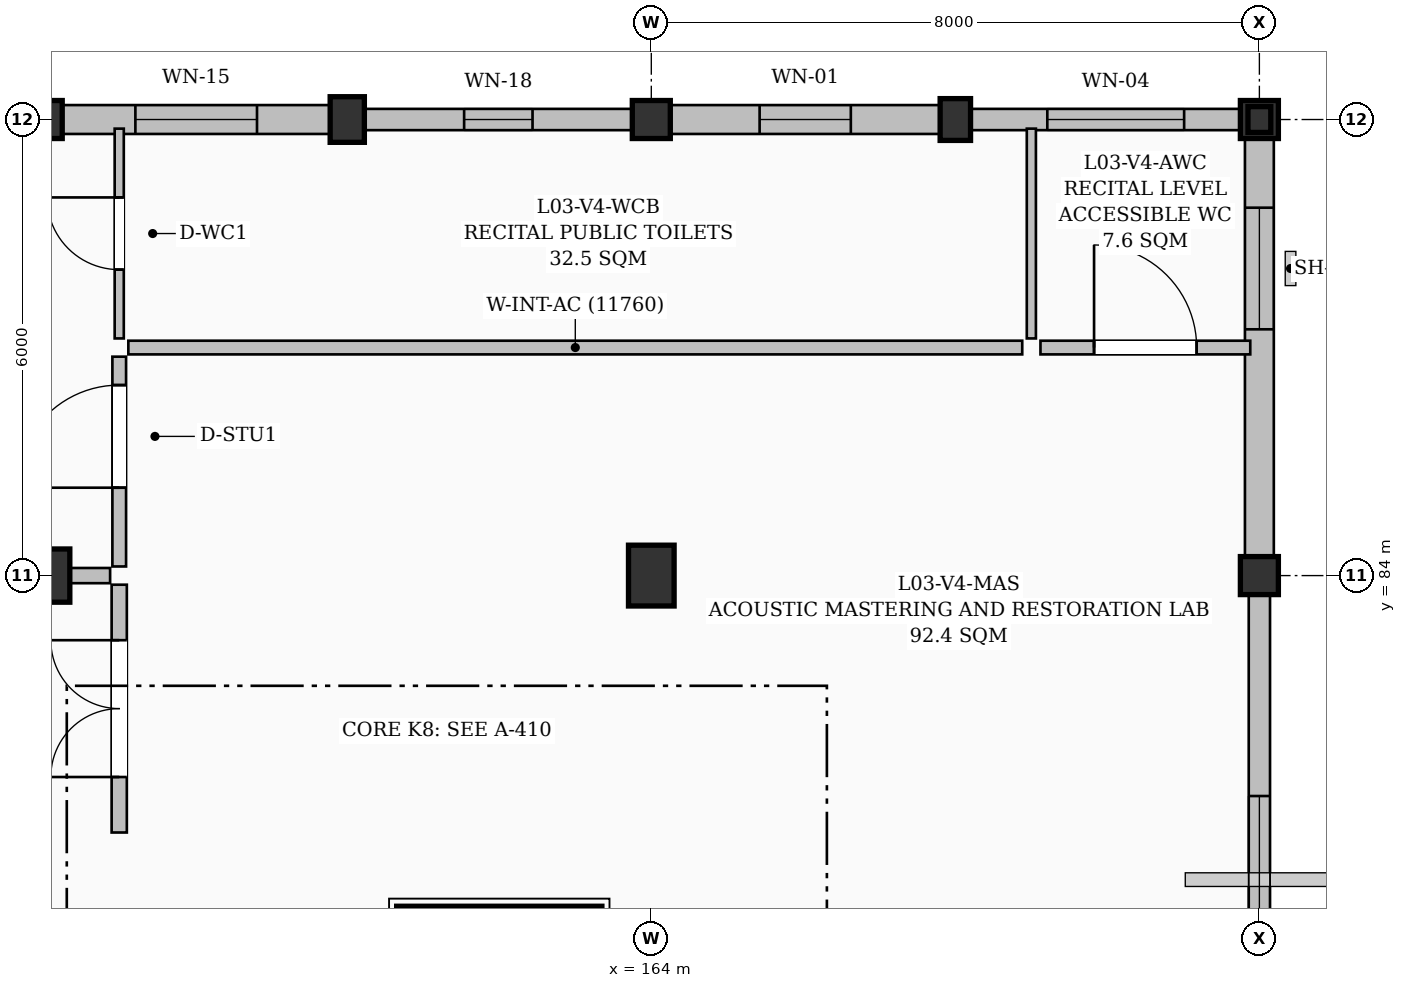
"""IFC4 building model, lengths in metres.
Left out: names, types, materials, properties, quantities, classifications, styles, units other than length and angle.
Written with IfcOpenShell. Run it as: python <this file> out.ifc"""

import sys

from ifc_helpers import new_model, si_unit, direction, frame, frame_2d, origin, origin_2d, place, context, subcontext, project, spatial, rectangle, i_section, extrude, element, fill, save


model = new_model("IFC4")
c1 = context("Model", 3, precision=1e-05, world=origin(), true_north=direction((0.0, 1.0)))
c2 = subcontext(c1, "Body", "Model", "MODEL_VIEW")
j1 = project(units=[si_unit("LENGTHUNIT", "METRE"), si_unit("PLANEANGLEUNIT", "RADIAN")], contexts=[c1])
p1 = place(None, origin())
s1 = spatial("IfcSite", under=j1, at=p1, CompositionType="ELEMENT")
p2 = place(p1, origin())
s2 = spatial("IfcBuilding", under=s1, at=p2, CompositionType="ELEMENT")
p3 = place(p2, frame((0.0, 0.0, 13.8)))
s3 = spatial("IfcBuildingStorey", under=s2, at=p3, CompositionType="ELEMENT", Elevation=13.8)
p4 = place(p3, frame((156.0, 84.0, 0.0), z_axis=(0.0, 0.0, 1.0), x_axis=(1.0, 0.0, 0.0)))
e1 = element("IfcColumn", 1, at=p4, inside=s3, PredefinedType="COLUMN", context=c2, shape_type="SweptSolid", body=[
    extrude(rectangle(XDim=0.7, YDim=0.7, at=origin_2d()), origin(), (0.0, 0.0, 1.0), 4.5),
])
p5 = place(p3, frame((156.0, 90.0, 0.0), z_axis=(0.0, 0.0, 1.0), x_axis=(1.0, 0.0, 0.0)))
e2 = element("IfcColumn", 2, at=p5, inside=s3, PredefinedType="COLUMN", context=c2, shape_type="SweptSolid", body=[
    extrude(rectangle(XDim=0.5, YDim=0.5, at=origin_2d()), origin(), (0.0, 0.0, 1.0), 4.5),
])
p6 = place(p3, frame((160.0, 90.0, 0.0), z_axis=(0.0, 0.0, 1.0), x_axis=(1.0, 0.0, 0.0)))
e3 = element("IfcColumn", 3, at=p6, inside=s3, PredefinedType="PILASTER", context=c2, shape_type="SweptSolid", body=[
    extrude(rectangle(XDim=0.45, YDim=0.6, at=origin_2d()), origin(), (0.0, 0.0, 1.0), 4.5),
])
p7 = place(p3, frame((164.0, 84.0, 0.0), z_axis=(0.0, 0.0, 1.0), x_axis=(1.0, 0.0, 0.0)))
e4 = element("IfcColumn", 4, at=p7, inside=s3, PredefinedType="COLUMN", context=c2, shape_type="SweptSolid", body=[
    extrude(rectangle(XDim=0.6, YDim=0.8, at=origin_2d()), origin(), (0.0, 0.0, 1.0), 4.5),
])
p8 = place(p3, frame((164.0, 90.0, 0.0), z_axis=(0.0, 0.0, 1.0), x_axis=(1.0, 0.0, 0.0)))
e5 = element("IfcColumn", 5, at=p8, inside=s3, PredefinedType="COLUMN", context=c2, shape_type="SweptSolid", body=[
    extrude(rectangle(XDim=0.5, YDim=0.5, at=origin_2d()), origin(), (0.0, 0.0, 1.0), 4.5),
])
p9 = place(p3, frame((168.0, 90.0, 0.0), z_axis=(0.0, 0.0, 1.0), x_axis=(1.0, 0.0, 0.0)))
e6 = element("IfcColumn", 6, at=p9, inside=s3, PredefinedType="PILASTER", context=c2, shape_type="SweptSolid", body=[
    extrude(rectangle(XDim=0.4, YDim=0.55, at=origin_2d()), origin(), (0.0, 0.0, 1.0), 4.5),
])
for number, where, z_axis, x_axis in (
    (7, (172.0, 84.0, 0.0), (0.0, 0.0, 1.0), (1.0, 0.0, 0.0)),
    (8, (172.0, 90.0, 0.0), (0.0, 0.0, 1.0), (1.0, 0.0, 0.0)),
):
    element("IfcColumn", number, at=place(p3, frame(where, z_axis=z_axis, x_axis=x_axis)), inside=s3, PredefinedType="COLUMN", context=c2, shape_type="SweptSolid", body=[
        extrude(rectangle(XDim=0.5, YDim=0.5, at=origin_2d()), origin(), (0.0, 0.0, 1.0), 4.5),
    ])
p10 = place(p3, frame((172.0, 90.0, 4.5), z_axis=(0.0, 0.0, 1.0), x_axis=(1.0, 0.0, 0.0)))
e9 = element("IfcColumn", 9, at=p10, inside=s3, PredefinedType="COLUMN", context=c2, shape_type="SweptSolid", body=[
    extrude(i_section(OverallWidth=0.3, OverallDepth=0.34, WebThickness=0.012, FlangeThickness=0.021, FilletRadius=0.027, at=origin_2d()), origin(), (0.0, 0.0, 1.0), 1.454),
])
p11 = place(p3, frame((156.25, 90.0, 0.0), z_axis=(0.0, 0.0, 1.0), x_axis=(1.0, 0.0, 0.0)))
e10 = element("IfcWall", 10, at=p11, inside=s3, PredefinedType="SOLIDWALL", context=c2, shape_type="SweptSolid", body=[
    extrude(rectangle(XDim=3.525, YDim=0.38, at=frame_2d((1.762, 0.0))), origin(), (0.0, 0.0, 1.0), 4.125),
])
p12 = place(p11, frame((0.962, 0.0, 0.95)))
e11 = element("IfcOpeningElement", 11, at=p12, cuts=e10, PredefinedType="OPENING", context=c2, shape_type="SweptSolid", body=[
    extrude(rectangle(XDim=1.6, YDim=1.2, at=frame_2d((0.8, 0.6))), frame((0.0, 0.2, 0.0), z_axis=(0.0, -1.0, 0.0), x_axis=(1.0, 0.0, 0.0)), (0.0, 0.0, 1.0), 0.4),
])
p13 = place(p3, frame((160.225, 90.0, 0.0), z_axis=(0.0, 0.0, 1.0), x_axis=(1.0, 0.0, 0.0)))
e12 = element("IfcWall", 12, at=p13, inside=s3, PredefinedType="SOLIDWALL", context=c2, shape_type="SweptSolid", body=[
    extrude(rectangle(XDim=3.525, YDim=0.28, at=frame_2d((1.762, 0.0))), origin(), (0.0, 0.0, 1.0), 4.125),
])
p14 = place(p13, frame((1.312, 0.0, 0.95)))
e13 = element("IfcOpeningElement", 13, at=p14, cuts=e12, PredefinedType="OPENING", context=c2, shape_type="SweptSolid", body=[
    extrude(rectangle(XDim=0.9, YDim=1.8, at=frame_2d((0.45, 0.9))), frame((0.0, 0.15, 0.0), z_axis=(0.0, -1.0, 0.0), x_axis=(1.0, 0.0, 0.0)), (0.0, 0.0, 1.0), 0.3),
])
p15 = place(p3, frame((164.25, 90.0, 0.0), z_axis=(0.0, 0.0, 1.0), x_axis=(1.0, 0.0, 0.0)))
e14 = element("IfcWall", 14, at=p15, inside=s3, PredefinedType="SOLIDWALL", context=c2, shape_type="SweptSolid", body=[
    extrude(rectangle(XDim=3.55, YDim=0.38, at=frame_2d((1.775, 0.0))), origin(), (0.0, 0.0, 1.0), 4.125),
])
p16 = place(p15, frame((1.175, 0.0, 0.95)))
e15 = element("IfcOpeningElement", 15, at=p16, cuts=e14, PredefinedType="OPENING", context=c2, shape_type="SweptSolid", body=[
    extrude(rectangle(XDim=1.2, YDim=1.8, at=frame_2d((0.6, 0.9))), frame((0.0, 0.2, 0.0), z_axis=(0.0, -1.0, 0.0), x_axis=(1.0, 0.0, 0.0)), (0.0, 0.0, 1.0), 0.4),
])
p17 = place(p3, frame((168.2, 90.0, 0.0), z_axis=(0.0, 0.0, 1.0), x_axis=(1.0, 0.0, 0.0)))
e16 = element("IfcWall", 16, at=p17, inside=s3, PredefinedType="SOLIDWALL", context=c2, shape_type="SweptSolid", body=[
    extrude(rectangle(XDim=3.55, YDim=0.28, at=frame_2d((1.775, 0.0))), origin(), (0.0, 0.0, 1.0), 4.125),
])
p18 = place(p17, frame((1.01, 0.0, 0.95)))
e17 = element("IfcOpeningElement", 17, at=p18, cuts=e16, PredefinedType="OPENING", context=c2, shape_type="SweptSolid", body=[
    extrude(rectangle(XDim=1.8, YDim=1.8, at=frame_2d((0.9, 0.9))), frame((0.0, 0.15, 0.0), z_axis=(0.0, -1.0, 0.0), x_axis=(1.0, 0.0, 0.0)), (0.0, 0.0, 1.0), 0.3),
])
p19 = place(p3, frame((172.0, 89.75, 0.0), z_axis=(0.0, 0.0, 1.0), x_axis=(0.0, -1.0, 0.0)))
e18 = element("IfcWall", 18, at=p19, inside=s3, PredefinedType="SOLIDWALL", context=c2, shape_type="SweptSolid", body=[
    extrude(rectangle(XDim=5.5, YDim=0.38, at=frame_2d((2.75, 0.0))), origin(), (0.0, 0.0, 1.0), 3.585),
])
p20 = place(p19, frame((0.91, 0.0, 0.95)))
e19 = element("IfcOpeningElement", 19, at=p20, cuts=e18, PredefinedType="OPENING", context=c2, shape_type="SweptSolid", body=[
    extrude(rectangle(XDim=1.6, YDim=1.8, at=frame_2d((0.8, 0.9))), frame((0.0, 0.2, 0.0), z_axis=(0.0, -1.0, 0.0), x_axis=(1.0, 0.0, 0.0)), (0.0, 0.0, 1.0), 0.4),
])
p21 = place(p3, frame((172.0, 83.75, 0.0), z_axis=(0.0, 0.0, 1.0), x_axis=(0.0, -1.0, 0.0)))
e20 = element("IfcWall", 20, at=p21, inside=s3, PredefinedType="SOLIDWALL", context=c2, shape_type="SweptSolid", body=[
    extrude(rectangle(XDim=7.5, YDim=0.28, at=frame_2d((3.75, 0.0))), origin(), (0.0, 0.0, 1.0), 3.585),
])
p22 = place(p21, frame((2.65, 0.0, 0.95)))
e21 = element("IfcOpeningElement", 21, at=p22, cuts=e20, PredefinedType="OPENING", context=c2, shape_type="SweptSolid", body=[
    extrude(rectangle(XDim=2.2, YDim=1.8, at=frame_2d((1.1, 0.9))), frame((0.0, 0.15, 0.0), z_axis=(0.0, -1.0, 0.0), x_axis=(1.0, 0.0, 0.0)), (0.0, 0.0, 1.0), 0.3),
])
p23 = place(p3, frame((163.35, 79.5, 0.0), z_axis=(0.0, 0.0, 1.0), x_axis=(-1.0, 0.0, 0.0)))
e22 = element("IfcWall", 22, at=p23, inside=s3, PredefinedType="SHEAR", context=c2, shape_type="SweptSolid", body=[
    extrude(rectangle(XDim=2.7, YDim=0.3, at=frame_2d((1.35, 0.0))), origin(), (0.0, 0.0, 1.0), 4.25),
])
p24 = place(p3, frame((140.37, 84.0, 0.0), z_axis=(0.0, 0.0, 1.0), x_axis=(1.0, 0.0, 0.0)))
e23 = element("IfcWall", 23, at=p24, inside=s3, PredefinedType="PARTITIONING", context=c2, shape_type="SweptSolid", body=[
    extrude(rectangle(XDim=16.51, YDim=0.2, at=frame_2d((8.255, 0.0))), origin(), (0.0, 0.0, 1.0), 4.25),
])
p25 = place(p24, frame((9.336, 0.0, 0.0)))
e24 = element("IfcOpeningElement", 24, at=p25, cuts=e23, PredefinedType="OPENING", context=c2, shape_type="SweptSolid", body=[
    extrude(rectangle(XDim=1.8, YDim=2.35, at=frame_2d((0.9, 1.175))), frame((0.0, 0.11, 0.0), z_axis=(0.0, -1.0, 0.0), x_axis=(1.0, 0.0, 0.0)), (0.0, 0.0, 1.0), 0.22),
])
p26 = place(p3, frame((157.0, 80.62, 0.0), z_axis=(0.0, 0.0, 1.0), x_axis=(0.0, 1.0, 0.0)))
e25 = element("IfcWall", 25, at=p26, inside=s3, PredefinedType="PARTITIONING", context=c2, shape_type="SweptSolid", body=[
    extrude(rectangle(XDim=3.26, YDim=0.2, at=frame_2d((1.63, 0.0))), origin(), (0.0, 0.0, 1.0), 4.25),
])
p27 = place(p26, frame((0.73, 0.0, 0.0)))
e26 = element("IfcOpeningElement", 26, at=p27, cuts=e25, PredefinedType="OPENING", context=c2, shape_type="SweptSolid", body=[
    extrude(rectangle(XDim=1.8, YDim=2.35, at=frame_2d((0.9, 1.175))), frame((0.0, 0.11, 0.0), z_axis=(0.0, -1.0, 0.0), x_axis=(1.0, 0.0, 0.0)), (0.0, 0.0, 1.0), 0.22),
])
p28 = place(p3, frame((157.0, 84.12, 0.0), z_axis=(0.0, 0.0, 1.0), x_axis=(0.0, 1.0, 0.0)))
e27 = element("IfcWall", 27, at=p28, inside=s3, PredefinedType="PARTITIONING", context=c2, shape_type="SweptSolid", body=[
    extrude(rectangle(XDim=2.76, YDim=0.18, at=frame_2d((1.38, 0.0))), origin(), (0.0, 0.0, 1.0), 4.25),
])
p29 = place(p28, frame((1.036, 0.0, 0.0)))
e28 = element("IfcOpeningElement", 28, at=p29, cuts=e27, PredefinedType="OPENING", context=c2, shape_type="SweptSolid", body=[
    extrude(rectangle(XDim=1.35, YDim=2.2, at=frame_2d((0.675, 1.1))), frame((0.0, 0.1, 0.0), z_axis=(0.0, -1.0, 0.0), x_axis=(1.0, 0.0, 0.0)), (0.0, 0.0, 1.0), 0.2),
])
p30 = place(p3, frame((157.0, 87.12, 0.0), z_axis=(0.0, 0.0, 1.0), x_axis=(0.0, 1.0, 0.0)))
e29 = element("IfcWall", 29, at=p30, inside=s3, PredefinedType="PARTITIONING", context=c2, shape_type="SweptSolid", body=[
    extrude(rectangle(XDim=2.76, YDim=0.12, at=frame_2d((1.38, 0.0))), origin(), (0.0, 0.0, 1.0), 4.25),
])
p31 = place(p30, frame((0.905, 0.0, 0.0)))
e30 = element("IfcOpeningElement", 30, at=p31, cuts=e29, PredefinedType="OPENING", context=c2, shape_type="SweptSolid", body=[
    extrude(rectangle(XDim=0.95, YDim=2.1, at=frame_2d((0.475, 1.05))), frame((0.0, 0.07, 0.0), z_axis=(0.0, -1.0, 0.0), x_axis=(1.0, 0.0, 0.0)), (0.0, 0.0, 1.0), 0.14),
])
p32 = place(p3, frame((169.12, 87.0, 0.0), z_axis=(0.0, 0.0, 1.0), x_axis=(1.0, 0.0, 0.0)))
e31 = element("IfcWall", 31, at=p32, inside=s3, PredefinedType="PARTITIONING", context=c2, shape_type="SweptSolid", body=[
    extrude(rectangle(XDim=2.76, YDim=0.18, at=frame_2d((1.38, 0.0))), origin(), (0.0, 0.0, 1.0), 4.25),
])
p33 = place(p32, frame((0.705, 0.0, 0.0)))
e32 = element("IfcOpeningElement", 32, at=p33, cuts=e31, PredefinedType="OPENING", context=c2, shape_type="SweptSolid", body=[
    extrude(rectangle(XDim=1.35, YDim=2.2, at=frame_2d((0.675, 1.1))), frame((0.0, 0.1, 0.0), z_axis=(0.0, -1.0, 0.0), x_axis=(1.0, 0.0, 0.0)), (0.0, 0.0, 1.0), 0.2),
])
p34 = place(p3, frame((157.12, 87.0, 0.0), z_axis=(0.0, 0.0, 1.0), x_axis=(1.0, 0.0, 0.0)))
e33 = element("IfcWall", 33, at=p34, inside=s3, PredefinedType="PARTITIONING", context=c2, shape_type="SweptSolid", body=[
    extrude(rectangle(XDim=11.76, YDim=0.18, at=frame_2d((5.88, 0.0))), origin(), (0.0, 0.0, 1.0), 4.25),
])
p35 = place(p3, frame((169.0, 87.12, 0.0), z_axis=(0.0, 0.0, 1.0), x_axis=(0.0, 1.0, 0.0)))
e34 = element("IfcWall", 34, at=p35, inside=s3, PredefinedType="PARTITIONING", context=c2, shape_type="SweptSolid", body=[
    extrude(rectangle(XDim=2.76, YDim=0.12, at=frame_2d((1.38, 0.0))), origin(), (0.0, 0.0, 1.0), 4.25),
])
p36 = place(p12, origin())
e35 = element("IfcWindow", 35, at=p36, inside=s3, PartitioningType="DOUBLE_PANEL_HORIZONTAL", PredefinedType="WINDOW", context=c2, shape_type="SweptSolid", body=[
    extrude(rectangle(XDim=1.6, YDim=1.2, at=frame_2d((0.8, 0.6))), frame((0.0, 0.03, 0.0), z_axis=(0.0, -1.0, 0.0), x_axis=(1.0, 0.0, 0.0)), (0.0, 0.0, 1.0), 0.06),
])
fill(e11, e35)
p37 = place(p14, origin())
e36 = element("IfcWindow", 36, at=p37, inside=s3, PartitioningType="SINGLE_PANEL", PredefinedType="WINDOW", context=c2, shape_type="SweptSolid", body=[
    extrude(rectangle(XDim=0.9, YDim=1.8, at=frame_2d((0.45, 0.9))), frame((0.0, 0.03, 0.0), z_axis=(0.0, -1.0, 0.0), x_axis=(1.0, 0.0, 0.0)), (0.0, 0.0, 1.0), 0.06),
])
fill(e13, e36)
p38 = place(p16, origin())
e37 = element("IfcWindow", 37, at=p38, inside=s3, PartitioningType="SINGLE_PANEL", PredefinedType="WINDOW", context=c2, shape_type="SweptSolid", body=[
    extrude(rectangle(XDim=1.2, YDim=1.8, at=frame_2d((0.6, 0.9))), frame((0.0, 0.03, 0.0), z_axis=(0.0, -1.0, 0.0), x_axis=(1.0, 0.0, 0.0)), (0.0, 0.0, 1.0), 0.06),
])
fill(e15, e37)
p39 = place(p18, origin())
e38 = element("IfcWindow", 38, at=p39, inside=s3, PartitioningType="DOUBLE_PANEL_VERTICAL", PredefinedType="WINDOW", context=c2, shape_type="SweptSolid", body=[
    extrude(rectangle(XDim=1.8, YDim=1.8, at=frame_2d((0.9, 0.9))), frame((0.0, 0.03, 0.0), z_axis=(0.0, -1.0, 0.0), x_axis=(1.0, 0.0, 0.0)), (0.0, 0.0, 1.0), 0.06),
])
fill(e17, e38)
p40 = place(p20, origin())
e39 = element("IfcWindow", 39, at=p40, inside=s3, PartitioningType="DOUBLE_PANEL_VERTICAL", PredefinedType="WINDOW", context=c2, shape_type="SweptSolid", body=[
    extrude(rectangle(XDim=1.6, YDim=1.8, at=frame_2d((0.8, 0.9))), frame((0.0, 0.03, 0.0), z_axis=(0.0, -1.0, 0.0), x_axis=(1.0, 0.0, 0.0)), (0.0, 0.0, 1.0), 0.06),
])
fill(e19, e39)
p41 = place(p22, origin())
e40 = element("IfcWindow", 40, at=p41, inside=s3, PartitioningType="TRIPLE_PANEL_VERTICAL", PredefinedType="WINDOW", context=c2, shape_type="SweptSolid", body=[
    extrude(rectangle(XDim=2.2, YDim=1.8, at=frame_2d((1.1, 0.9))), frame((0.0, 0.03, 0.0), z_axis=(0.0, -1.0, 0.0), x_axis=(1.0, 0.0, 0.0)), (0.0, 0.0, 1.0), 0.06),
])
fill(e21, e40)
p42 = place(p27, origin())
e41 = element("IfcDoor", 41, at=p42, inside=s3, OperationType="DOUBLE_DOOR_SINGLE_SWING", PredefinedType="DOOR", context=c2, shape_type="SweptSolid", body=[
    extrude(rectangle(XDim=1.8, YDim=2.35, at=frame_2d((0.9, 1.175))), frame((0.0, 0.025, 0.0), z_axis=(0.0, -1.0, 0.0), x_axis=(1.0, 0.0, 0.0)), (0.0, 0.0, 1.0), 0.05),
])
fill(e26, e41)
p43 = place(p29, origin())
e42 = element("IfcDoor", 42, at=p43, inside=s3, OperationType="SINGLE_SWING_LEFT", PredefinedType="DOOR", context=c2, shape_type="SweptSolid", body=[
    extrude(rectangle(XDim=1.35, YDim=2.2, at=frame_2d((0.675, 1.1))), frame((0.0, 0.025, 0.0), z_axis=(0.0, -1.0, 0.0), x_axis=(1.0, 0.0, 0.0)), (0.0, 0.0, 1.0), 0.05),
])
fill(e28, e42)
p44 = place(p31, origin())
e43 = element("IfcDoor", 43, at=p44, inside=s3, OperationType="SINGLE_SWING_RIGHT", PredefinedType="DOOR", context=c2, shape_type="SweptSolid", body=[
    extrude(rectangle(XDim=0.95, YDim=2.1, at=frame_2d((0.475, 1.05))), frame((0.0, 0.025, 0.0), z_axis=(0.0, -1.0, 0.0), x_axis=(1.0, 0.0, 0.0)), (0.0, 0.0, 1.0), 0.05),
])
fill(e30, e43)
p45 = place(p33, origin())
e44 = element("IfcDoor", 44, at=p45, inside=s3, OperationType="SINGLE_SWING_LEFT", PredefinedType="DOOR", context=c2, shape_type="SweptSolid", body=[
    extrude(rectangle(XDim=1.35, YDim=2.2, at=frame_2d((0.675, 1.1))), frame((0.0, 0.025, 0.0), z_axis=(0.0, -1.0, 0.0), x_axis=(1.0, 0.0, 0.0)), (0.0, 0.0, 1.0), 0.05),
])
fill(e32, e44)
save(model, sys.argv[1])
